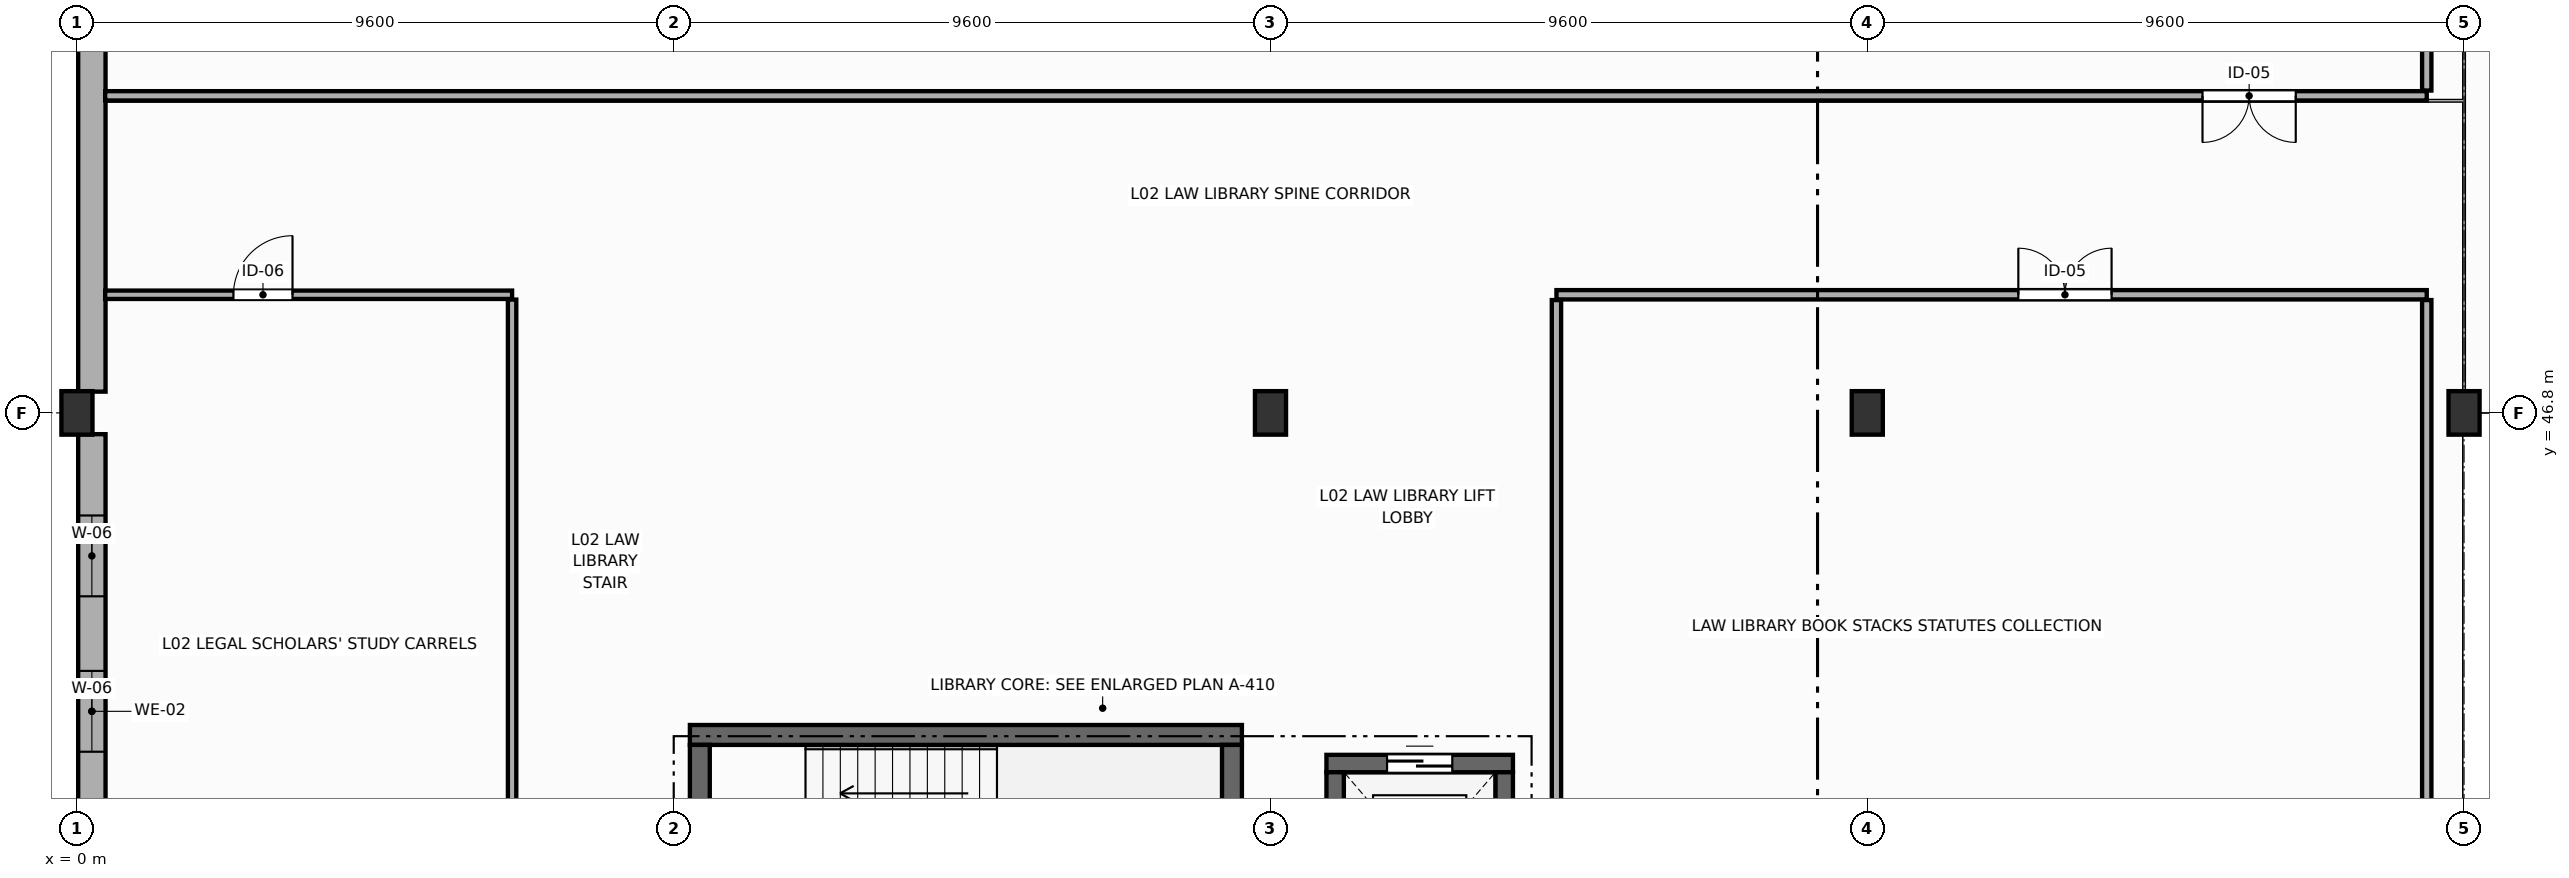
"""IFC4 building model, lengths in metres.
Left out: names, types, materials, properties, quantities, classifications, styles, units other than length and angle.
Written with IfcOpenShell. Run it as: python <this file> out.ifc"""

import sys

from ifc_helpers import new_model, si_unit, direction, frame, frame_2d, origin, origin_2d, place, context, subcontext, project, spatial, rectangle, extrude, element, fill, save


model = new_model("IFC4")
c1 = context("Model", 3, precision=1e-05, world=origin(), true_north=direction((0.0, 1.0)))
c2 = subcontext(c1, "Body", "Model", "MODEL_VIEW")
j1 = project(units=[si_unit("LENGTHUNIT", "METRE"), si_unit("PLANEANGLEUNIT", "RADIAN")], contexts=[c1])
p1 = place(None, origin())
s1 = spatial("IfcSite", under=j1, at=p1, CompositionType="ELEMENT")
p2 = place(p1, origin())
s2 = spatial("IfcBuilding", under=s1, at=p2, CompositionType="ELEMENT")
p3 = place(p2, frame((0.0, 0.0, 5.4)))
s3 = spatial("IfcBuildingStorey", under=s2, at=p3, CompositionType="ELEMENT", Elevation=5.4)
for number, where, z_axis, x_axis in (
    (1, (0.0, 46.8, 0.0), (0.0, 0.0, 1.0), (1.0, 0.0, 0.0)),
    (2, (19.2, 46.8, 0.0), (0.0, 0.0, 1.0), (1.0, 0.0, 0.0)),
    (3, (28.8, 46.8, 0.0), (0.0, 0.0, 1.0), (1.0, 0.0, 0.0)),
    (4, (38.4, 46.8, 0.0), (0.0, 0.0, 1.0), (1.0, 0.0, 0.0)),
):
    element("IfcColumn", number, at=place(p3, frame(where, z_axis=z_axis, x_axis=x_axis)), inside=s3, PredefinedType="COLUMN", context=c2, shape_type="SweptSolid", body=[
        extrude(rectangle(XDim=0.5, YDim=0.7, at=origin_2d()), origin(), (0.0, 0.0, 1.0), 4.5),
    ])
p4 = place(p3, frame((0.24, 37.542, 0.0), z_axis=(0.0, 0.0, 1.0), x_axis=(0.0, 1.0, 0.0)))
e5 = element("IfcWall", 5, at=p4, inside=s3, PredefinedType="STANDARD", context=c2, shape_type="SweptSolid", body=[
    extrude(rectangle(XDim=8.916, YDim=0.44, at=frame_2d((4.458, 0.0))), origin(), (0.0, 0.0, 1.0), 3.38),
])
p5 = place(p4, frame((1.308, 0.0, 0.9)))
e6 = element("IfcOpeningElement", 6, at=p5, cuts=e5, PredefinedType="OPENING", context=c2, shape_type="SweptSolid", body=[
    extrude(rectangle(XDim=1.3, YDim=2.1, at=frame_2d((0.65, 1.05))), frame((0.0, 0.23, 0.0), z_axis=(0.0, -1.0, 0.0), x_axis=(1.0, 0.0, 0.0)), (0.0, 0.0, 1.0), 0.46),
])
p6 = place(p4, frame((3.808, 0.0, 0.9)))
e7 = element("IfcOpeningElement", 7, at=p6, cuts=e5, PredefinedType="OPENING", context=c2, shape_type="SweptSolid", body=[
    extrude(rectangle(XDim=1.3, YDim=2.1, at=frame_2d((0.65, 1.05))), frame((0.0, 0.23, 0.0), z_axis=(0.0, -1.0, 0.0), x_axis=(1.0, 0.0, 0.0)), (0.0, 0.0, 1.0), 0.46),
])
p7 = place(p4, frame((6.308, 0.0, 0.9)))
e8 = element("IfcOpeningElement", 8, at=p7, cuts=e5, PredefinedType="OPENING", context=c2, shape_type="SweptSolid", body=[
    extrude(rectangle(XDim=1.3, YDim=2.1, at=frame_2d((0.65, 1.05))), frame((0.0, 0.23, 0.0), z_axis=(0.0, -1.0, 0.0), x_axis=(1.0, 0.0, 0.0)), (0.0, 0.0, 1.0), 0.46),
])
p8 = place(p3, frame((0.24, 47.142, 0.0), z_axis=(0.0, 0.0, 1.0), x_axis=(0.0, 1.0, 0.0)))
e9 = element("IfcWall", 9, at=p8, inside=s3, PredefinedType="STANDARD", context=c2, shape_type="SweptSolid", body=[
    extrude(rectangle(XDim=8.916, YDim=0.44, at=frame_2d((4.458, 0.0))), origin(), (0.0, 0.0, 1.0), 3.38),
])
p9 = place(p8, frame((6.308, 0.0, 0.9)))
e10 = element("IfcOpeningElement", 10, at=p9, cuts=e9, PredefinedType="OPENING", context=c2, shape_type="SweptSolid", body=[
    extrude(rectangle(XDim=1.3, YDim=2.1, at=frame_2d((0.65, 1.05))), frame((0.0, 0.23, 0.0), z_axis=(0.0, -1.0, 0.0), x_axis=(1.0, 0.0, 0.0)), (0.0, 0.0, 1.0), 0.46),
])
p10 = place(p3, frame((9.86, 41.62, 0.0), z_axis=(0.0, 0.0, 1.0), x_axis=(1.0, 0.0, 0.0)))
e11 = element("IfcWall", 11, at=p10, inside=s3, PredefinedType="SHEAR", context=c2, shape_type="SweptSolid", body=[
    extrude(rectangle(XDim=8.88, YDim=0.32, at=frame_2d((4.44, 0.0))), origin(), (0.0, 0.0, 1.0), 4.24),
])
p11 = place(p3, frame((10.02, 38.18, 0.0), z_axis=(0.0, 0.0, 1.0), x_axis=(0.0, 1.0, 0.0)))
e12 = element("IfcWall", 12, at=p11, inside=s3, PredefinedType="SHEAR", context=c2, shape_type="SweptSolid", body=[
    extrude(rectangle(XDim=3.28, YDim=0.32, at=frame_2d((1.64, 0.0))), origin(), (0.0, 0.0, 1.0), 4.24),
])
p12 = place(p11, frame((1.065, 0.0, 0.0)))
e13 = element("IfcOpeningElement", 13, at=p12, cuts=e12, PredefinedType="OPENING", context=c2, shape_type="SweptSolid", body=[
    extrude(rectangle(XDim=1.15, YDim=2.2, at=frame_2d((0.575, 1.1))), frame((0.0, 0.17, 0.0), z_axis=(0.0, -1.0, 0.0), x_axis=(1.0, 0.0, 0.0)), (0.0, 0.0, 1.0), 0.34),
])
p13 = place(p3, frame((18.58, 41.46, 0.0), z_axis=(0.0, 0.0, 1.0), x_axis=(0.0, -1.0, 0.0)))
e14 = element("IfcWall", 14, at=p13, inside=s3, PredefinedType="SHEAR", context=c2, shape_type="SweptSolid", body=[
    extrude(rectangle(XDim=3.28, YDim=0.32, at=frame_2d((1.64, 0.0))), origin(), (0.0, 0.0, 1.0), 4.24),
])
p14 = place(p3, frame((20.1, 41.16, 0.0), z_axis=(0.0, 0.0, 1.0), x_axis=(1.0, 0.0, 0.0)))
e15 = element("IfcWall", 15, at=p14, inside=s3, PredefinedType="SHEAR", context=c2, shape_type="SweptSolid", body=[
    extrude(rectangle(XDim=3.0, YDim=0.28, at=frame_2d((1.5, 0.0))), origin(), (0.0, 0.0, 1.0), 4.24),
])
p15 = place(p14, frame((0.975, 0.0, 0.0)))
e16 = element("IfcOpeningElement", 16, at=p15, cuts=e15, PredefinedType="OPENING", context=c2, shape_type="SweptSolid", body=[
    extrude(rectangle(XDim=1.05, YDim=2.2, at=frame_2d((0.525, 1.1))), frame((0.0, 0.15, 0.0), z_axis=(0.0, -1.0, 0.0), x_axis=(1.0, 0.0, 0.0)), (0.0, 0.0, 1.0), 0.3),
])
for number, where, z_axis, x_axis in (
    (17, (20.24, 38.18, 0.0), (0.0, 0.0, 1.0), (0.0, 1.0, 0.0)),
    (18, (22.96, 41.02, 0.0), (0.0, 0.0, 1.0), (0.0, -1.0, 0.0)),
):
    element("IfcWall", number, at=place(p3, frame(where, z_axis=z_axis, x_axis=x_axis)), inside=s3, PredefinedType="SHEAR", context=c2, shape_type="SweptSolid", body=[
        extrude(rectangle(XDim=2.84, YDim=0.28, at=frame_2d((1.42, 0.0))), origin(), (0.0, 0.0, 1.0), 4.24),
    ])
p16 = place(p3, frame((37.8, 51.9, 0.0), z_axis=(0.0, 0.0, 1.0), x_axis=(-1.0, 0.0, 0.0)))
e19 = element("IfcWall", 19, at=p16, inside=s3, PredefinedType="PARTITIONING", context=c2, shape_type="SweptSolid", body=[
    extrude(rectangle(XDim=37.346, YDim=0.15, at=frame_2d((18.673, 0.0))), origin(), (0.0, 0.0, 1.0), 3.23),
])
p17 = place(p16, frame((2.107, 0.0, 0.0)))
e20 = element("IfcOpeningElement", 20, at=p17, cuts=e19, PredefinedType="OPENING", context=c2, shape_type="SweptSolid", body=[
    extrude(rectangle(XDim=1.5, YDim=2.35, at=frame_2d((0.75, 1.175))), frame((0.0, 0.085, 0.0), z_axis=(0.0, -1.0, 0.0), x_axis=(1.0, 0.0, 0.0)), (0.0, 0.0, 1.0), 0.17),
])
p18 = place(p3, frame((37.8, 66.515, 0.0), z_axis=(0.0, 0.0, 1.0), x_axis=(0.0, -1.0, 0.0)))
e21 = element("IfcWall", 21, at=p18, inside=s3, PredefinedType="PARTITIONING", context=c2, shape_type="SweptSolid", body=[
    extrude(rectangle(XDim=14.53, YDim=0.15, at=frame_2d((7.265, 0.0))), origin(), (0.0, 0.0, 1.0), 3.43),
])
p19 = place(p3, frame((0.454, 48.7, 0.0), z_axis=(0.0, 0.0, 1.0), x_axis=(1.0, 0.0, 0.0)))
e22 = element("IfcWall", 22, at=p19, inside=s3, PredefinedType="PARTITIONING", context=c2, shape_type="SweptSolid", body=[
    extrude(rectangle(XDim=6.546, YDim=0.135, at=frame_2d((3.273, 0.0))), origin(), (0.0, 0.0, 1.0), 3.38),
])
p20 = place(p19, frame((2.064, 0.0, 0.0)))
e23 = element("IfcOpeningElement", 23, at=p20, cuts=e22, PredefinedType="OPENING", context=c2, shape_type="SweptSolid", body=[
    extrude(rectangle(XDim=0.95, YDim=2.15, at=frame_2d((0.475, 1.075))), frame((0.0, 0.077, 0.0), z_axis=(0.0, -1.0, 0.0), x_axis=(1.0, 0.0, 0.0)), (0.0, 0.0, 1.0), 0.155),
])
p21 = place(p3, frame((7.0, 48.623, 0.0), z_axis=(0.0, 0.0, 1.0), x_axis=(0.0, -1.0, 0.0)))
e24 = element("IfcWall", 24, at=p21, inside=s3, PredefinedType="PARTITIONING", context=c2, shape_type="SweptSolid", body=[
    extrude(rectangle(XDim=11.448, YDim=0.135, at=frame_2d((5.724, 0.0))), origin(), (0.0, 0.0, 1.0), 3.43),
])
p22 = place(p3, frame((23.8, 48.7, 0.0), z_axis=(0.0, 0.0, 1.0), x_axis=(1.0, 0.0, 0.0)))
e25 = element("IfcWall", 25, at=p22, inside=s3, PredefinedType="PARTITIONING", context=c2, shape_type="SweptSolid", body=[
    extrude(rectangle(XDim=14.0, YDim=0.15, at=frame_2d((7.0, 0.0))), origin(), (0.0, 0.0, 1.0), 3.38),
])
p23 = place(p22, frame((7.43, 0.0, 0.0)))
e26 = element("IfcOpeningElement", 26, at=p23, cuts=e25, PredefinedType="OPENING", context=c2, shape_type="SweptSolid", body=[
    extrude(rectangle(XDim=1.5, YDim=2.35, at=frame_2d((0.75, 1.175))), frame((0.0, 0.085, 0.0), z_axis=(0.0, -1.0, 0.0), x_axis=(1.0, 0.0, 0.0)), (0.0, 0.0, 1.0), 0.17),
])
for number, where, z_axis, x_axis in (
    (27, (23.8, 37.885, 0.0), (0.0, 0.0, 1.0), (0.0, 1.0, 0.0)),
    (28, (37.8, 48.615, 0.0), (0.0, 0.0, 1.0), (0.0, -1.0, 0.0)),
):
    element("IfcWall", number, at=place(p3, frame(where, z_axis=z_axis, x_axis=x_axis)), inside=s3, PredefinedType="PARTITIONING", context=c2, shape_type="SweptSolid", body=[
        extrude(rectangle(XDim=10.73, YDim=0.15, at=frame_2d((5.365, 0.0))), origin(), (0.0, 0.0, 1.0), 3.43),
    ])
p24 = place(p6, origin())
e29 = element("IfcWindow", 29, at=p24, inside=s3, PartitioningType="SINGLE_PANEL", PredefinedType="WINDOW", context=c2, shape_type="SweptSolid", body=[
    extrude(rectangle(XDim=1.3, YDim=2.1, at=frame_2d((0.65, 1.05))), frame((0.0, 0.03, 0.0), z_axis=(0.0, -1.0, 0.0), x_axis=(1.0, 0.0, 0.0)), (0.0, 0.0, 1.0), 0.06),
])
fill(e7, e29)
p25 = place(p7, origin())
e30 = element("IfcWindow", 30, at=p25, inside=s3, PartitioningType="SINGLE_PANEL", PredefinedType="WINDOW", context=c2, shape_type="SweptSolid", body=[
    extrude(rectangle(XDim=1.3, YDim=2.1, at=frame_2d((0.65, 1.05))), frame((0.0, 0.03, 0.0), z_axis=(0.0, -1.0, 0.0), x_axis=(1.0, 0.0, 0.0)), (0.0, 0.0, 1.0), 0.06),
])
fill(e8, e30)
p26 = place(p15, origin())
e31 = element("IfcDoor", 31, at=p26, inside=s3, OperationType="DOUBLE_DOOR_SLIDING", PredefinedType="DOOR", context=c2, shape_type="SweptSolid", body=[
    extrude(rectangle(XDim=1.05, YDim=2.2, at=frame_2d((0.525, 1.1))), frame((0.0, 0.025, 0.0), z_axis=(0.0, -1.0, 0.0), x_axis=(1.0, 0.0, 0.0)), (0.0, 0.0, 1.0), 0.05),
])
fill(e16, e31)
p27 = place(p17, origin())
e32 = element("IfcDoor", 32, at=p27, inside=s3, OperationType="DOUBLE_DOOR_SINGLE_SWING", PredefinedType="DOOR", context=c2, shape_type="SweptSolid", body=[
    extrude(rectangle(XDim=1.5, YDim=2.35, at=frame_2d((0.75, 1.175))), frame((0.0, 0.025, 0.0), z_axis=(0.0, -1.0, 0.0), x_axis=(1.0, 0.0, 0.0)), (0.0, 0.0, 1.0), 0.05),
])
fill(e20, e32)
p28 = place(p20, origin())
e33 = element("IfcDoor", 33, at=p28, inside=s3, OperationType="SINGLE_SWING_RIGHT", PredefinedType="DOOR", context=c2, shape_type="SweptSolid", body=[
    extrude(rectangle(XDim=0.95, YDim=2.15, at=frame_2d((0.475, 1.075))), frame((0.0, 0.025, 0.0), z_axis=(0.0, -1.0, 0.0), x_axis=(1.0, 0.0, 0.0)), (0.0, 0.0, 1.0), 0.05),
])
fill(e23, e33)
p29 = place(p23, origin())
e34 = element("IfcDoor", 34, at=p29, inside=s3, OperationType="DOUBLE_DOOR_SINGLE_SWING", PredefinedType="DOOR", context=c2, shape_type="SweptSolid", body=[
    extrude(rectangle(XDim=1.5, YDim=2.35, at=frame_2d((0.75, 1.175))), frame((0.0, 0.025, 0.0), z_axis=(0.0, -1.0, 0.0), x_axis=(1.0, 0.0, 0.0)), (0.0, 0.0, 1.0), 0.05),
])
fill(e26, e34)
save(model, sys.argv[1])
